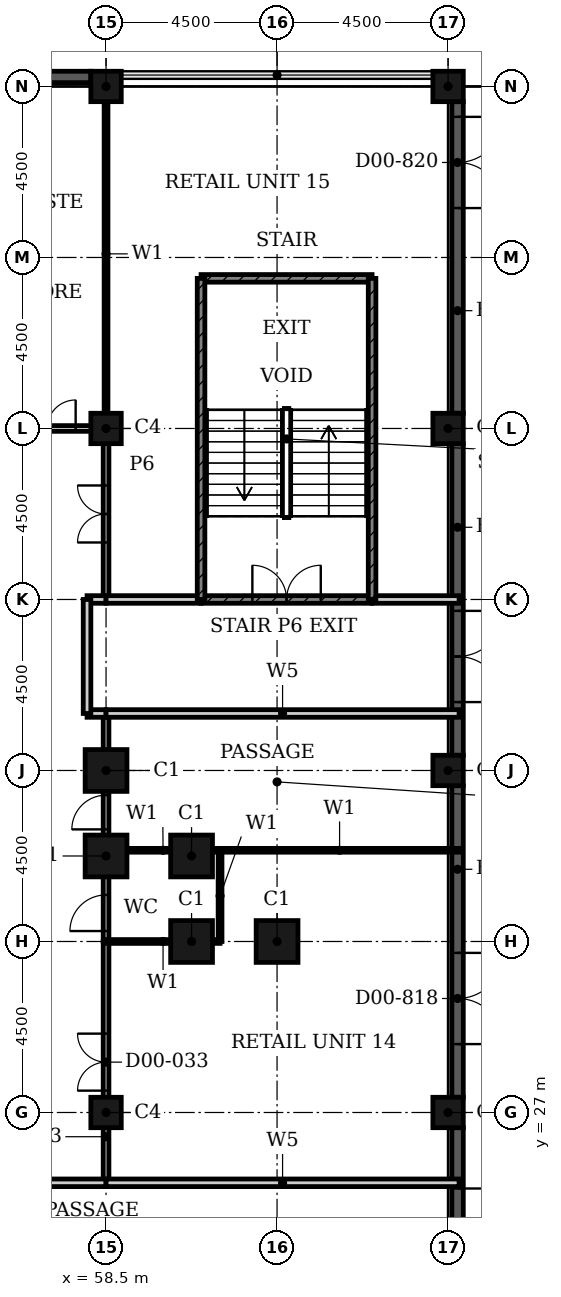
"""IFC4 building model, lengths in metres.
Left out: names, types, materials, properties, quantities, classifications, styles, units other than length and angle.
Written with IfcOpenShell. Run it as: python <this file> out.ifc"""

import sys

from ifc_helpers import new_model, si_unit, direction, frame, frame_2d, origin, origin_2d, place, context, subcontext, project, spatial, rectangle, hollow_rectangle, extrude, element, fill, save


model = new_model("IFC4")
c1 = context("Model", 3, precision=1e-05, world=origin(), true_north=direction((0.0, 1.0)))
c2 = subcontext(c1, "Body", "Model", "MODEL_VIEW")
j1 = project(units=[si_unit("LENGTHUNIT", "METRE"), si_unit("PLANEANGLEUNIT", "RADIAN")], contexts=[c1])
p1 = place(None, origin())
s1 = spatial("IfcSite", under=j1, at=p1, CompositionType="ELEMENT")
p2 = place(p1, origin())
s2 = spatial("IfcBuilding", under=s1, at=p2, CompositionType="ELEMENT")
p3 = place(p2, origin())
s3 = spatial("IfcBuildingStorey", under=s2, at=p3, CompositionType="ELEMENT", Elevation=0.0)
for number, where, z_axis, x_axis in (
    (1, (63.0, 31.5, 0.0), (0.0, 0.0, 1.0), (1.0, 0.0, 0.0)),
    (2, (60.75, 31.5, 0.0), (0.0, 0.0, 1.0), (1.0, 0.0, 0.0)),
    (3, (60.75, 33.75, 0.0), (0.0, 0.0, 1.0), (1.0, 0.0, 0.0)),
    (4, (58.5, 33.75, 0.0), (0.0, 0.0, 1.0), (1.0, 0.0, 0.0)),
    (5, (58.5, 36.0, 0.0), (0.0, 0.0, 1.0), (1.0, 0.0, 0.0)),
):
    element("IfcColumn", number, at=place(p3, frame(where, z_axis=z_axis, x_axis=x_axis)), inside=s3, PredefinedType="COLUMN", context=c2, shape_type="SweptSolid", body=[
        extrude(hollow_rectangle(XDim=1.1, YDim=1.1, WallThickness=0.036, at=origin_2d()), origin(), (0.0, 0.0, 1.0), 6.6),
    ])
for number, where, z_axis, x_axis in (
    (6, (58.5, 54.0, 0.0), (0.0, 0.0, 1.0), (1.0, 0.0, 0.0)),
    (7, (67.5, 27.0, 0.0), (0.0, 0.0, 1.0), (1.0, 0.0, 0.0)),
    (8, (67.5, 36.0, 0.0), (0.0, 0.0, 1.0), (1.0, 0.0, 0.0)),
    (9, (67.5, 45.0, 0.0), (0.0, 0.0, 1.0), (1.0, 0.0, 0.0)),
    (10, (67.5, 54.0, 0.0), (0.0, 0.0, 1.0), (1.0, 0.0, 0.0)),
    (11, (58.5, 27.0, 0.0), (0.0, 0.0, 1.0), (1.0, 0.0, 0.0)),
    (12, (58.5, 45.0, 0.0), (0.0, 0.0, 1.0), (1.0, 0.0, 0.0)),
):
    element("IfcColumn", number, at=place(p3, frame(where, z_axis=z_axis, x_axis=x_axis)), inside=s3, PredefinedType="COLUMN", context=c2, shape_type="SweptSolid", body=[
        extrude(hollow_rectangle(XDim=0.8, YDim=0.8, WallThickness=0.025, at=origin_2d()), origin(), (0.0, 0.0, 1.0), 6.6),
    ])
p4 = place(p3, frame((67.75, 26.6, 0.0), z_axis=(0.0, 0.0, 1.0), x_axis=(0.0, -1.0, 0.0)))
e13 = element("IfcWall", 13, at=p4, inside=s3, PredefinedType="SOLIDWALL", context=c2, shape_type="SweptSolid", body=[
    extrude(rectangle(XDim=8.2, YDim=0.3, at=frame_2d((4.1, 0.0))), origin(), (0.0, 0.0, 1.0), 6.6),
])
p5 = place(p4, frame((1.6, 0.0, 0.0)))
e14 = element("IfcOpeningElement", 14, at=p5, cuts=e13, PredefinedType="OPENING", context=c2, shape_type="SweptSolid", body=[
    extrude(rectangle(XDim=2.4, YDim=2.4, at=frame_2d((1.2, 1.2))), frame((0.0, 0.16, 0.0), z_axis=(0.0, -1.0, 0.0), x_axis=(1.0, 0.0, 0.0)), (0.0, 0.0, 1.0), 0.32),
])
p6 = place(p3, frame((67.75, 35.6, 0.0), z_axis=(0.0, 0.0, 1.0), x_axis=(0.0, -1.0, 0.0)))
e15 = element("IfcWall", 15, at=p6, inside=s3, PredefinedType="SOLIDWALL", context=c2, shape_type="SweptSolid", body=[
    extrude(rectangle(XDim=8.2, YDim=0.3, at=frame_2d((4.1, 0.0))), origin(), (0.0, 0.0, 1.0), 6.6),
])
p7 = place(p6, frame((4.4, 0.0, 0.0)))
e16 = element("IfcOpeningElement", 16, at=p7, cuts=e15, PredefinedType="OPENING", context=c2, shape_type="SweptSolid", body=[
    extrude(rectangle(XDim=2.4, YDim=2.4, at=frame_2d((1.2, 1.2))), frame((0.0, 0.16, 0.0), z_axis=(0.0, -1.0, 0.0), x_axis=(1.0, 0.0, 0.0)), (0.0, 0.0, 1.0), 0.32),
])
p8 = place(p3, frame((67.75, 44.6, 0.0), z_axis=(0.0, 0.0, 1.0), x_axis=(0.0, -1.0, 0.0)))
e17 = element("IfcWall", 17, at=p8, inside=s3, PredefinedType="SOLIDWALL", context=c2, shape_type="SweptSolid", body=[
    extrude(rectangle(XDim=8.2, YDim=0.3, at=frame_2d((4.1, 0.0))), origin(), (0.0, 0.0, 1.0), 6.6),
])
p9 = place(p8, frame((4.4, 0.0, 0.0)))
e18 = element("IfcOpeningElement", 18, at=p9, cuts=e17, PredefinedType="OPENING", context=c2, shape_type="SweptSolid", body=[
    extrude(rectangle(XDim=2.4, YDim=2.4, at=frame_2d((1.2, 1.2))), frame((0.0, 0.16, 0.0), z_axis=(0.0, -1.0, 0.0), x_axis=(1.0, 0.0, 0.0)), (0.0, 0.0, 1.0), 0.32),
])
p10 = place(p3, frame((67.75, 53.6, 0.0), z_axis=(0.0, 0.0, 1.0), x_axis=(0.0, -1.0, 0.0)))
e19 = element("IfcWall", 19, at=p10, inside=s3, PredefinedType="SOLIDWALL", context=c2, shape_type="SweptSolid", body=[
    extrude(rectangle(XDim=8.2, YDim=0.3, at=frame_2d((4.1, 0.0))), origin(), (0.0, 0.0, 1.0), 6.6),
])
p11 = place(p10, frame((0.4, 0.0, 0.0)))
e20 = element("IfcOpeningElement", 20, at=p11, cuts=e19, PredefinedType="OPENING", context=c2, shape_type="SweptSolid", body=[
    extrude(rectangle(XDim=2.4, YDim=2.4, at=frame_2d((1.2, 1.2))), frame((0.0, 0.16, 0.0), z_axis=(0.0, -1.0, 0.0), x_axis=(1.0, 0.0, 0.0)), (0.0, 0.0, 1.0), 0.32),
])
p12 = place(p3, frame((49.9, 54.25, 0.0), z_axis=(0.0, 0.0, 1.0), x_axis=(1.0, 0.0, 0.0)))
e21 = element("IfcWall", 21, at=p12, inside=s3, PredefinedType="SOLIDWALL", context=c2, shape_type="SweptSolid", body=[
    extrude(rectangle(XDim=8.2, YDim=0.3, at=frame_2d((4.1, 0.0))), origin(), (0.0, 0.0, 1.0), 6.6),
])
p13 = place(p12, frame((2.9, 0.0, 0.0)))
e22 = element("IfcOpeningElement", 22, at=p13, cuts=e21, PredefinedType="OPENING", context=c2, shape_type="SweptSolid", body=[
    extrude(rectangle(XDim=2.4, YDim=2.4, at=frame_2d((1.2, 1.2))), frame((0.0, 0.16, 0.0), z_axis=(0.0, -1.0, 0.0), x_axis=(1.0, 0.0, 0.0)), (0.0, 0.0, 1.0), 0.32),
])
p14 = place(p3, frame((55.4, 45.0, 0.0), z_axis=(0.0, 0.0, 1.0), x_axis=(1.0, 0.0, 0.0)))
e23 = element("IfcWall", 23, at=p14, inside=s3, PredefinedType="PARTITIONING", context=c2, shape_type="SweptSolid", body=[
    extrude(rectangle(XDim=3.1, YDim=0.15, at=frame_2d((1.55, 0.0))), origin(), (0.0, 0.0, 1.0), 6.25),
])
p15 = place(p14, frame((0.8, 0.0, 0.0)))
e24 = element("IfcOpeningElement", 24, at=p15, cuts=e23, PredefinedType="OPENING", context=c2, shape_type="SweptSolid", body=[
    extrude(rectangle(XDim=1.5, YDim=2.4, at=frame_2d((0.75, 1.2))), frame((0.0, 0.085, 0.0), z_axis=(0.0, -1.0, 0.0), x_axis=(1.0, 0.0, 0.0)), (0.0, 0.0, 1.0), 0.17),
])
p16 = place(p3, frame((58.5, 25.15, 0.0), z_axis=(0.0, 0.0, 1.0), x_axis=(0.0, 1.0, 0.0)))
e25 = element("IfcWall", 25, at=p16, inside=s3, PredefinedType="PARTITIONING", context=c2, shape_type="SweptSolid", body=[
    extrude(rectangle(XDim=6.35, YDim=0.15, at=frame_2d((3.175, 0.0))), origin(), (0.0, 0.0, 1.0), 6.25),
])
p17 = place(p16, frame((2.425, 0.0, 0.0)))
e26 = element("IfcOpeningElement", 26, at=p17, cuts=e25, PredefinedType="OPENING", context=c2, shape_type="SweptSolid", body=[
    extrude(rectangle(XDim=1.5, YDim=2.4, at=frame_2d((0.75, 1.2))), frame((0.0, 0.085, 0.0), z_axis=(0.0, -1.0, 0.0), x_axis=(1.0, 0.0, 0.0)), (0.0, 0.0, 1.0), 0.17),
])
p18 = place(p3, frame((58.5, 31.5, 0.0), z_axis=(0.0, 0.0, 1.0), x_axis=(0.0, 1.0, 0.0)))
e27 = element("IfcWall", 27, at=p18, inside=s3, PredefinedType="PARTITIONING", context=c2, shape_type="SweptSolid", body=[
    extrude(rectangle(XDim=2.4, YDim=0.15, at=frame_2d((1.2, 0.0))), origin(), (0.0, 0.0, 1.0), 6.25),
])
p19 = place(p18, frame((0.275, 0.0, 0.0)))
e28 = element("IfcOpeningElement", 28, at=p19, cuts=e27, PredefinedType="OPENING", context=c2, shape_type="SweptSolid", body=[
    extrude(rectangle(XDim=0.95, YDim=2.1, at=frame_2d((0.475, 1.05))), frame((0.0, 0.085, 0.0), z_axis=(0.0, -1.0, 0.0), x_axis=(1.0, 0.0, 0.0)), (0.0, 0.0, 1.0), 0.17),
])
p20 = place(p3, frame((58.5, 33.9, 0.0), z_axis=(0.0, 0.0, 1.0), x_axis=(0.0, 1.0, 0.0)))
e29 = element("IfcWall", 29, at=p20, inside=s3, PredefinedType="PARTITIONING", context=c2, shape_type="SweptSolid", body=[
    extrude(rectangle(XDim=3.6, YDim=0.15, at=frame_2d((1.8, 0.0))), origin(), (0.0, 0.0, 1.0), 6.25),
])
p21 = place(p20, frame((0.55, 0.0, 0.0)))
e30 = element("IfcOpeningElement", 30, at=p21, cuts=e29, PredefinedType="OPENING", context=c2, shape_type="SweptSolid", body=[
    extrude(rectangle(XDim=0.9, YDim=2.1, at=frame_2d((0.45, 1.05))), frame((0.0, 0.085, 0.0), z_axis=(0.0, -1.0, 0.0), x_axis=(1.0, 0.0, 0.0)), (0.0, 0.0, 1.0), 0.17),
])
p22 = place(p3, frame((58.5, 40.5, 0.0), z_axis=(0.0, 0.0, 1.0), x_axis=(0.0, 1.0, 0.0)))
e31 = element("IfcWall", 31, at=p22, inside=s3, PredefinedType="PARTITIONING", context=c2, shape_type="SweptSolid", body=[
    extrude(rectangle(XDim=4.5, YDim=0.15, at=frame_2d((2.25, 0.0))), origin(), (0.0, 0.0, 1.0), 6.25),
])
p23 = place(p22, frame((1.5, 0.0, 0.0)))
e32 = element("IfcOpeningElement", 32, at=p23, cuts=e31, PredefinedType="OPENING", context=c2, shape_type="SweptSolid", body=[
    extrude(rectangle(XDim=1.5, YDim=2.4, at=frame_2d((0.75, 1.2))), frame((0.0, 0.085, 0.0), z_axis=(0.0, -1.0, 0.0), x_axis=(1.0, 0.0, 0.0)), (0.0, 0.0, 1.0), 0.17),
])
p24 = place(p3, frame((58.5, 31.5, 0.0), z_axis=(0.0, 0.0, 1.0), x_axis=(1.0, 0.0, 0.0)))
e33 = element("IfcWall", 33, at=p24, inside=s3, PredefinedType="PARTITIONING", context=c2, shape_type="SweptSolid", body=[
    extrude(rectangle(XDim=3.0, YDim=0.1, at=frame_2d((1.5, 0.0))), origin(), (0.0, 0.0, 1.0), 6.25),
])
p25 = place(p3, frame((61.5, 33.9, 0.0), z_axis=(0.0, 0.0, 1.0), x_axis=(1.0, 0.0, 0.0)))
e34 = element("IfcWall", 34, at=p25, inside=s3, PredefinedType="PARTITIONING", context=c2, shape_type="SweptSolid", body=[
    extrude(rectangle(XDim=6.29, YDim=0.1, at=frame_2d((3.145, 0.0))), origin(), (0.0, 0.0, 1.0), 6.25),
])
p26 = place(p3, frame((58.5, 33.9, 0.0), z_axis=(0.0, 0.0, 1.0), x_axis=(1.0, 0.0, 0.0)))
e35 = element("IfcWall", 35, at=p26, inside=s3, PredefinedType="PARTITIONING", context=c2, shape_type="SweptSolid", body=[
    extrude(rectangle(XDim=3.0, YDim=0.1, at=frame_2d((1.5, 0.0))), origin(), (0.0, 0.0, 1.0), 6.25),
])
p27 = place(p3, frame((58.5, 45.0, 0.0), z_axis=(0.0, 0.0, 1.0), x_axis=(0.0, 1.0, 0.0)))
e36 = element("IfcWall", 36, at=p27, inside=s3, PredefinedType="PARTITIONING", context=c2, shape_type="SweptSolid", body=[
    extrude(rectangle(XDim=9.19, YDim=0.1, at=frame_2d((4.595, 0.0))), origin(), (0.0, 0.0, 1.0), 6.25),
])
p28 = place(p3, frame((61.5, 31.5, 0.0), z_axis=(0.0, 0.0, 1.0), x_axis=(0.0, 1.0, 0.0)))
e37 = element("IfcWall", 37, at=p28, inside=s3, PredefinedType="PARTITIONING", context=c2, shape_type="SweptSolid", body=[
    extrude(rectangle(XDim=2.4, YDim=0.1, at=frame_2d((1.2, 0.0))), origin(), (0.0, 0.0, 1.0), 6.25),
])
p29 = place(p3, frame((45.0, 25.15, 0.0), z_axis=(0.0, 0.0, 1.0), x_axis=(1.0, 0.0, 0.0)))
e38 = element("IfcWall", 38, at=p29, inside=s3, PredefinedType="PARTITIONING", context=c2, shape_type="SweptSolid", body=[
    extrude(rectangle(XDim=13.5, YDim=0.2, at=frame_2d((6.75, 0.0))), origin(), (0.0, 0.0, 1.0), 6.25),
])
p30 = place(p3, frame((58.5, 25.15, 0.0), z_axis=(0.0, 0.0, 1.0), x_axis=(1.0, 0.0, 0.0)))
e39 = element("IfcWall", 39, at=p30, inside=s3, PredefinedType="PARTITIONING", context=c2, shape_type="SweptSolid", body=[
    extrude(rectangle(XDim=9.29, YDim=0.2, at=frame_2d((4.645, 0.0))), origin(), (0.0, 0.0, 1.0), 6.25),
])
p31 = place(p3, frame((58.0, 37.5, 0.0), z_axis=(0.0, 0.0, 1.0), x_axis=(1.0, 0.0, 0.0)))
e40 = element("IfcWall", 40, at=p31, inside=s3, PredefinedType="PARTITIONING", context=c2, shape_type="SweptSolid", body=[
    extrude(rectangle(XDim=0.5, YDim=0.2, at=frame_2d((0.25, 0.0))), origin(), (0.0, 0.0, 1.0), 6.25),
])
p32 = place(p3, frame((58.5, 37.5, 0.0), z_axis=(0.0, 0.0, 1.0), x_axis=(1.0, 0.0, 0.0)))
e41 = element("IfcWall", 41, at=p32, inside=s3, PredefinedType="PARTITIONING", context=c2, shape_type="SweptSolid", body=[
    extrude(rectangle(XDim=9.29, YDim=0.2, at=frame_2d((4.645, 0.0))), origin(), (0.0, 0.0, 1.0), 6.25),
])
p33 = place(p3, frame((58.0, 40.5, 0.0), z_axis=(0.0, 0.0, 1.0), x_axis=(1.0, 0.0, 0.0)))
e42 = element("IfcWall", 42, at=p33, inside=s3, PredefinedType="PARTITIONING", context=c2, shape_type="SweptSolid", body=[
    extrude(rectangle(XDim=0.5, YDim=0.2, at=frame_2d((0.25, 0.0))), origin(), (0.0, 0.0, 1.0), 6.25),
])
p34 = place(p3, frame((58.5, 40.5, 0.0), z_axis=(0.0, 0.0, 1.0), x_axis=(1.0, 0.0, 0.0)))
e43 = element("IfcWall", 43, at=p34, inside=s3, PredefinedType="PARTITIONING", context=c2, shape_type="SweptSolid", body=[
    extrude(rectangle(XDim=2.5, YDim=0.2, at=frame_2d((1.25, 0.0))), origin(), (0.0, 0.0, 1.0), 6.25),
])
p35 = place(p3, frame((65.5, 40.5, 0.0), z_axis=(0.0, 0.0, 1.0), x_axis=(1.0, 0.0, 0.0)))
e44 = element("IfcWall", 44, at=p35, inside=s3, PredefinedType="PARTITIONING", context=c2, shape_type="SweptSolid", body=[
    extrude(rectangle(XDim=2.29, YDim=0.2, at=frame_2d((1.145, 0.0))), origin(), (0.0, 0.0, 1.0), 6.25),
])
p36 = place(p3, frame((58.0, 37.5, 0.0), z_axis=(0.0, 0.0, 1.0), x_axis=(0.0, 1.0, 0.0)))
e45 = element("IfcWall", 45, at=p36, inside=s3, PredefinedType="PARTITIONING", context=c2, shape_type="SweptSolid", body=[
    extrude(rectangle(XDim=3.0, YDim=0.2, at=frame_2d((1.5, 0.0))), origin(), (0.0, 0.0, 1.0), 6.25),
])
p37 = place(p3, frame((61.0, 40.5, 0.0), z_axis=(0.0, 0.0, 1.0), x_axis=(1.0, 0.0, 0.0)))
e46 = element("IfcWall", 46, at=p37, inside=s3, PredefinedType="SHEAR", context=c2, shape_type="SweptSolid", body=[
    extrude(rectangle(XDim=4.5, YDim=0.2, at=frame_2d((2.25, 0.0))), origin(), (0.0, 0.0, 1.0), 6.25),
])
p38 = place(p37, frame((1.35, 0.0, 0.0)))
e47 = element("IfcOpeningElement", 47, at=p38, cuts=e46, PredefinedType="OPENING", context=c2, shape_type="SweptSolid", body=[
    extrude(rectangle(XDim=1.8, YDim=2.1, at=frame_2d((0.9, 1.05))), frame((0.0, 0.11, 0.0), z_axis=(0.0, -1.0, 0.0), x_axis=(1.0, 0.0, 0.0)), (0.0, 0.0, 1.0), 0.22),
])
p39 = place(p3, frame((61.0, 48.95, 0.0), z_axis=(0.0, 0.0, 1.0), x_axis=(1.0, 0.0, 0.0)))
e48 = element("IfcWall", 48, at=p39, inside=s3, PredefinedType="SHEAR", context=c2, shape_type="SweptSolid", body=[
    extrude(rectangle(XDim=4.5, YDim=0.2, at=frame_2d((2.25, 0.0))), origin(), (0.0, 0.0, 1.0), 6.25),
])
for number, where, z_axis, x_axis in (
    (49, (61.0, 40.5, 0.0), (0.0, 0.0, 1.0), (0.0, 1.0, 0.0)),
    (50, (65.5, 40.5, 0.0), (0.0, 0.0, 1.0), (0.0, 1.0, 0.0)),
):
    element("IfcWall", number, at=place(p3, frame(where, z_axis=z_axis, x_axis=x_axis)), inside=s3, PredefinedType="SHEAR", context=c2, shape_type="SweptSolid", body=[
        extrude(rectangle(XDim=8.45, YDim=0.2, at=frame_2d((4.225, 0.0))), origin(), (0.0, 0.0, 1.0), 6.25),
    ])
p40 = place(p5, origin())
e51 = element("IfcDoor", 51, at=p40, inside=s3, OperationType="DOUBLE_DOOR_SINGLE_SWING", PredefinedType="DOOR", context=c2, shape_type="SweptSolid", body=[
    extrude(rectangle(XDim=2.4, YDim=2.4, at=frame_2d((1.2, 1.2))), frame((0.0, 0.025, 0.0), z_axis=(0.0, -1.0, 0.0), x_axis=(1.0, 0.0, 0.0)), (0.0, 0.0, 1.0), 0.05),
])
fill(e14, e51)
p41 = place(p7, origin())
e52 = element("IfcDoor", 52, at=p41, inside=s3, OperationType="DOUBLE_DOOR_SINGLE_SWING", PredefinedType="DOOR", context=c2, shape_type="SweptSolid", body=[
    extrude(rectangle(XDim=2.4, YDim=2.4, at=frame_2d((1.2, 1.2))), frame((0.0, 0.025, 0.0), z_axis=(0.0, -1.0, 0.0), x_axis=(1.0, 0.0, 0.0)), (0.0, 0.0, 1.0), 0.05),
])
fill(e16, e52)
p42 = place(p9, origin())
e53 = element("IfcDoor", 53, at=p42, inside=s3, OperationType="DOUBLE_DOOR_SINGLE_SWING", PredefinedType="DOOR", context=c2, shape_type="SweptSolid", body=[
    extrude(rectangle(XDim=2.4, YDim=2.4, at=frame_2d((1.2, 1.2))), frame((0.0, 0.025, 0.0), z_axis=(0.0, -1.0, 0.0), x_axis=(1.0, 0.0, 0.0)), (0.0, 0.0, 1.0), 0.05),
])
fill(e18, e53)
p43 = place(p11, origin())
e54 = element("IfcDoor", 54, at=p43, inside=s3, OperationType="DOUBLE_DOOR_SINGLE_SWING", PredefinedType="DOOR", context=c2, shape_type="SweptSolid", body=[
    extrude(rectangle(XDim=2.4, YDim=2.4, at=frame_2d((1.2, 1.2))), frame((0.0, 0.025, 0.0), z_axis=(0.0, -1.0, 0.0), x_axis=(1.0, 0.0, 0.0)), (0.0, 0.0, 1.0), 0.05),
])
fill(e20, e54)
p44 = place(p38, origin())
e55 = element("IfcDoor", 55, at=p44, inside=s3, OperationType="DOUBLE_DOOR_SINGLE_SWING", PredefinedType="DOOR", context=c2, shape_type="SweptSolid", body=[
    extrude(rectangle(XDim=1.8, YDim=2.1, at=frame_2d((0.9, 1.05))), frame((0.0, 0.025, 0.0), z_axis=(0.0, -1.0, 0.0), x_axis=(1.0, 0.0, 0.0)), (0.0, 0.0, 1.0), 0.05),
])
fill(e47, e55)
p45 = place(p17, origin())
e56 = element("IfcDoor", 56, at=p45, inside=s3, OperationType="DOUBLE_DOOR_SINGLE_SWING", PredefinedType="DOOR", context=c2, shape_type="SweptSolid", body=[
    extrude(rectangle(XDim=1.5, YDim=2.4, at=frame_2d((0.75, 1.2))), frame((0.0, 0.025, 0.0), z_axis=(0.0, -1.0, 0.0), x_axis=(1.0, 0.0, 0.0)), (0.0, 0.0, 1.0), 0.05),
])
fill(e26, e56)
p46 = place(p19, origin())
e57 = element("IfcDoor", 57, at=p46, inside=s3, OperationType="SINGLE_SWING_LEFT", PredefinedType="DOOR", context=c2, shape_type="SweptSolid", body=[
    extrude(rectangle(XDim=0.95, YDim=2.1, at=frame_2d((0.475, 1.05))), frame((0.0, 0.025, 0.0), z_axis=(0.0, -1.0, 0.0), x_axis=(1.0, 0.0, 0.0)), (0.0, 0.0, 1.0), 0.05),
])
fill(e28, e57)
p47 = place(p21, origin())
e58 = element("IfcDoor", 58, at=p47, inside=s3, OperationType="SINGLE_SWING_LEFT", PredefinedType="DOOR", context=c2, shape_type="SweptSolid", body=[
    extrude(rectangle(XDim=0.9, YDim=2.1, at=frame_2d((0.45, 1.05))), frame((0.0, 0.025, 0.0), z_axis=(0.0, -1.0, 0.0), x_axis=(1.0, 0.0, 0.0)), (0.0, 0.0, 1.0), 0.05),
])
fill(e30, e58)
p48 = place(p23, origin())
e59 = element("IfcDoor", 59, at=p48, inside=s3, OperationType="DOUBLE_DOOR_SINGLE_SWING", PredefinedType="DOOR", context=c2, shape_type="SweptSolid", body=[
    extrude(rectangle(XDim=1.5, YDim=2.4, at=frame_2d((0.75, 1.2))), frame((0.0, 0.025, 0.0), z_axis=(0.0, -1.0, 0.0), x_axis=(1.0, 0.0, 0.0)), (0.0, 0.0, 1.0), 0.05),
])
fill(e32, e59)
p49 = place(p15, origin())
e60 = element("IfcDoor", 60, at=p49, inside=s3, OperationType="DOUBLE_DOOR_SINGLE_SWING", PredefinedType="DOOR", context=c2, shape_type="SweptSolid", body=[
    extrude(rectangle(XDim=1.5, YDim=2.4, at=frame_2d((0.75, 1.2))), frame((0.0, 0.025, 0.0), z_axis=(0.0, -1.0, 0.0), x_axis=(1.0, 0.0, 0.0)), (0.0, 0.0, 1.0), 0.05),
])
fill(e24, e60)
save(model, sys.argv[1])
